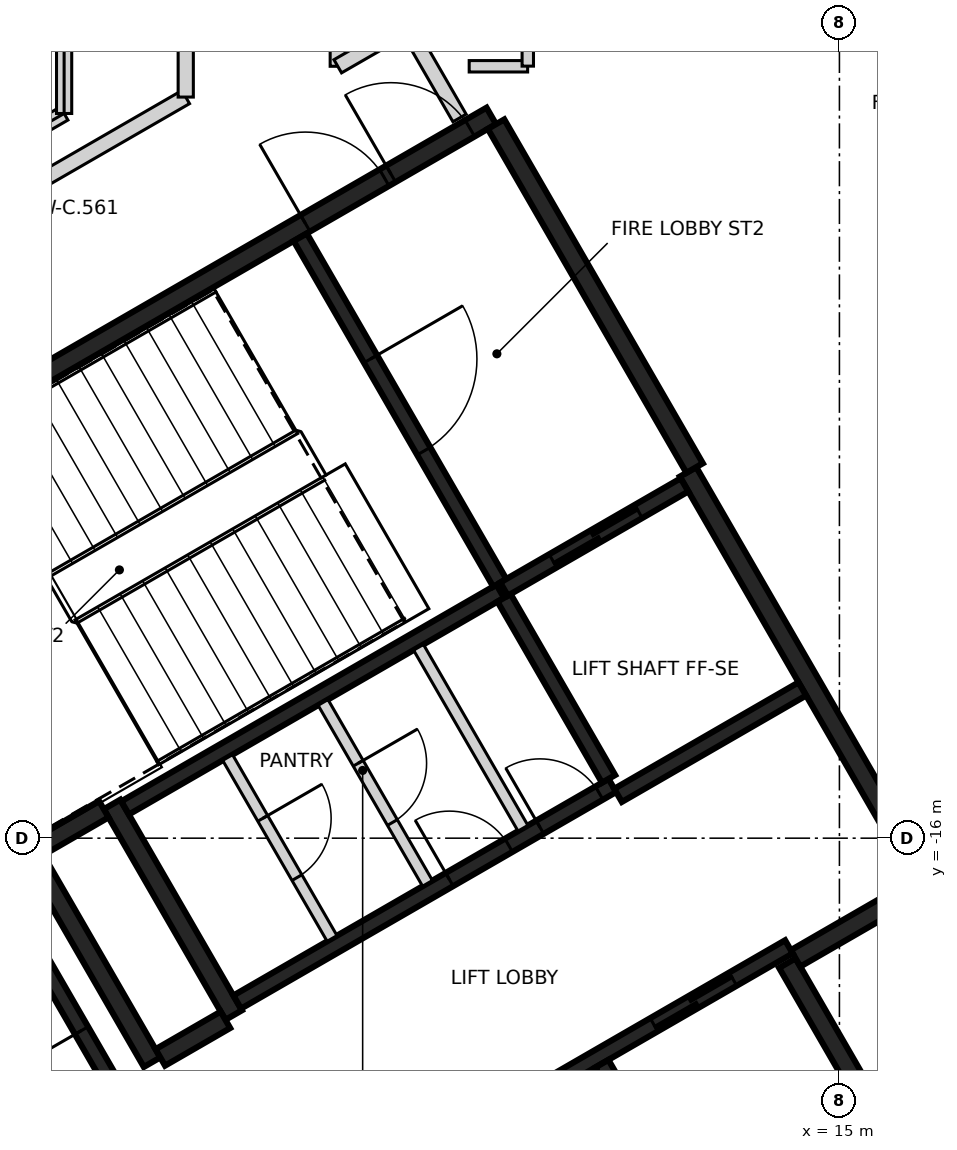
"""IFC4 building model, lengths in metres.
Left out: names, types, materials, properties, quantities, classifications, styles, units other than length and angle.
Written with IfcOpenShell. Run it as: python <this file> out.ifc"""

import sys

from ifc_helpers import new_model, si_unit, direction, frame, frame_2d, origin, place, context, subcontext, project, spatial, rectangle, extrude, element, fill, save


model = new_model("IFC4")
c1 = context("Model", 3, precision=1e-05, world=origin(), true_north=direction((0.0, 1.0)))
c2 = subcontext(c1, "Body", "Model", "MODEL_VIEW")
j1 = project(units=[si_unit("LENGTHUNIT", "METRE"), si_unit("PLANEANGLEUNIT", "RADIAN")], contexts=[c1])
p1 = place(None, origin())
s1 = spatial("IfcSite", under=j1, at=p1, CompositionType="ELEMENT")
p2 = place(p1, origin())
s2 = spatial("IfcBuilding", under=s1, at=p2, CompositionType="ELEMENT")
p3 = place(p2, frame((0.0, 0.0, 154.0)))
s3 = spatial("IfcBuildingStorey", under=s2, at=p3, CompositionType="ELEMENT", Elevation=154.0)
p4 = place(p3, frame((0.417, -12.273, 0.0), z_axis=(0.0, 0.0, 1.0), x_axis=(0.866021906294, 0.500006057782, 0.0)))
e1 = element("IfcWall", 1, at=p4, inside=s3, PredefinedType="SHEAR", context=c2, shape_type="SweptSolid", body=[
    extrude(rectangle(XDim=11.55, YDim=0.25, at=frame_2d((5.775, 0.0))), origin(), (0.0, 0.0, 1.0), 3.2),
])
p5 = place(p4, frame((10.025, 0.0, 0.0)))
e2 = element("IfcOpeningElement", 2, at=p5, cuts=e1, PredefinedType="OPENING", context=c2, shape_type="SweptSolid", body=[
    extrude(rectangle(XDim=1.2, YDim=2.1, at=frame_2d((0.6, 1.05))), frame((0.0, 0.135, 0.0), z_axis=(0.0, -1.0, 0.0), x_axis=(1.0, 0.0, 0.0)), (0.0, 0.0, 1.0), 0.27),
])
p6 = place(p4, frame((8.725, 0.0, 0.0)))
e3 = element("IfcOpeningElement", 3, at=p6, cuts=e1, PredefinedType="OPENING", context=c2, shape_type="SweptSolid", body=[
    extrude(rectangle(XDim=1.2, YDim=2.1, at=frame_2d((0.6, 1.05))), frame((0.0, 0.135, 0.0), z_axis=(0.0, -1.0, 0.0), x_axis=(1.0, 0.0, 0.0)), (0.0, 0.0, 1.0), 0.27),
])
p7 = place(p3, frame((13.008, -11.181, 0.0), z_axis=(0.0, 0.0, 1.0), x_axis=(0.500004234368, -0.866022959057, 0.0)))
e4 = element("IfcWall", 4, at=p7, inside=s3, PredefinedType="SHEAR", context=c2, shape_type="SweptSolid", body=[
    extrude(rectangle(XDim=6.25, YDim=0.25, at=frame_2d((3.125, 0.0))), origin(), (0.0, 0.0, 1.0), 3.2),
])
p8 = place(p3, frame((10.483, -6.606, 0.0), z_axis=(0.0, 0.0, 1.0), x_axis=(0.49999885962, -0.866026062182, 0.0)))
e5 = element("IfcWall", 5, at=p8, inside=s3, PredefinedType="SHEAR", context=c2, shape_type="SweptSolid", body=[
    extrude(rectangle(XDim=5.225, YDim=0.25, at=frame_2d((2.612, 0.0))), origin(), (0.0, 0.0, 1.0), 3.2),
])
p9 = place(p3, frame((7.031, -18.327, 0.0), z_axis=(0.0, 0.0, 1.0), x_axis=(-0.499971222258, 0.866042017984, 0.0)))
e6 = element("IfcWall", 6, at=p9, inside=s3, PredefinedType="SHEAR", context=c2, shape_type="SweptSolid", body=[
    extrude(rectangle(XDim=3.2, YDim=0.25, at=frame_2d((1.6, 0.0))), origin(), (0.0, 0.0, 1.0), 3.2),
])
p10 = place(p3, frame((14.315, -17.644, 0.0), z_axis=(0.0, 0.0, 1.0), x_axis=(0.500023226632, -0.866011993467, 0.0)))
e7 = element("IfcWall", 7, at=p10, inside=s3, PredefinedType="SHEAR", context=c2, shape_type="SweptSolid", body=[
    extrude(rectangle(XDim=2.974, YDim=0.25, at=frame_2d((1.487, 0.0))), origin(), (0.0, 0.0, 1.0), 3.2),
])
p11 = place(p3, frame((4.414, -16.276, 0.0), z_axis=(0.0, 0.0, 1.0), x_axis=(0.500003324108, -0.866023484601, 0.0)))
e8 = element("IfcWall", 8, at=p11, inside=s3, PredefinedType="SHEAR", context=c2, shape_type="SweptSolid", body=[
    extrude(rectangle(XDim=3.085, YDim=0.25, at=frame_2d((1.542, 0.0))), origin(), (0.0, 0.0, 1.0), 3.2),
])
p12 = place(p3, frame((5.322, -15.619, 0.0), z_axis=(0.0, 0.0, 1.0), x_axis=(-0.866026229868, -0.499998569178, 0.0)))
e9 = element("IfcWall", 9, at=p12, inside=s3, PredefinedType="SHEAR", context=c2, shape_type="SweptSolid", body=[
    extrude(rectangle(XDim=2.449, YDim=0.25, at=frame_2d((1.225, 0.0))), origin(), (0.0, 0.0, 1.0), 3.2),
])
p13 = place(p3, frame((16.025, -16.656, 0.0), z_axis=(0.0, 0.0, 1.0), x_axis=(-0.866016279763, -0.500015802937, 0.0)))
e10 = element("IfcWall", 10, at=p13, inside=s3, PredefinedType="SHEAR", context=c2, shape_type="SweptSolid", body=[
    extrude(rectangle(XDim=1.849, YDim=0.25, at=frame_2d((0.925, 0.0))), origin(), (0.0, 0.0, 1.0), 3.2),
])
p14 = place(p3, frame((6.065, -18.885, 0.0), z_axis=(0.0, 0.0, 1.0), x_axis=(0.866017078145, 0.500014420154, 0.0)))
e11 = element("IfcWall", 11, at=p14, inside=s3, PredefinedType="SHEAR", context=c2, shape_type="SweptSolid", body=[
    extrude(rectangle(XDim=0.989, YDim=0.25, at=frame_2d((0.495, 0.0))), origin(), (0.0, 0.0, 1.0), 3.2),
])
p15 = place(p3, frame((9.052, -20.48, 0.0), z_axis=(0.0, 0.0, 1.0), x_axis=(0.866030299012, 0.499991521122, 0.0)))
e12 = element("IfcWall", 12, at=p15, inside=s3, PredefinedType="SHEAR", context=c2, shape_type="SweptSolid", body=[
    extrude(rectangle(XDim=6.1, YDim=0.2, at=frame_2d((3.05, 0.0))), origin(), (0.0, 0.0, 1.0), 3.2),
])
p16 = place(p15, frame((1.0, 0.0, 0.0)))
e13 = element("IfcOpeningElement", 13, at=p16, cuts=e12, PredefinedType="OPENING", context=c2, shape_type="SweptSolid", body=[
    extrude(rectangle(XDim=1.2, YDim=2.1, at=frame_2d((0.6, 1.05))), frame((0.0, 0.11, 0.0), z_axis=(0.0, -1.0, 0.0), x_axis=(1.0, 0.0, 0.0)), (0.0, 0.0, 1.0), 0.22),
])
p17 = place(p15, frame((4.05, 0.0, 0.0)))
e14 = element("IfcOpeningElement", 14, at=p17, cuts=e12, PredefinedType="OPENING", context=c2, shape_type="SweptSolid", body=[
    extrude(rectangle(XDim=1.2, YDim=2.1, at=frame_2d((0.6, 1.05))), frame((0.0, 0.11, 0.0), z_axis=(0.0, -1.0, 0.0), x_axis=(1.0, 0.0, 0.0)), (0.0, 0.0, 1.0), 0.22),
])
p18 = place(p3, frame((10.538, -12.752, 0.0), z_axis=(0.0, 0.0, 1.0), x_axis=(-0.866038630372, -0.499977090179, 0.0)))
e15 = element("IfcWall", 15, at=p18, inside=s3, PredefinedType="SHEAR", context=c2, shape_type="SweptSolid", body=[
    extrude(rectangle(XDim=5.699, YDim=0.2, at=frame_2d((2.85, 0.0))), origin(), (0.0, 0.0, 1.0), 3.2),
])
p19 = place(p3, frame((7.077, -18.156, 0.0), z_axis=(0.0, 0.0, 1.0), x_axis=(0.866038630372, 0.499977090179, 0.0)))
e16 = element("IfcWall", 16, at=p19, inside=s3, PredefinedType="SHEAR", context=c2, shape_type="SweptSolid", body=[
    extrude(rectangle(XDim=5.699, YDim=0.2, at=frame_2d((2.85, 0.0))), origin(), (0.0, 0.0, 1.0), 3.2),
])
p20 = place(p19, frame((3.224, 0.0, 0.0)))
e17 = element("IfcOpeningElement", 17, at=p20, cuts=e16, PredefinedType="OPENING", context=c2, shape_type="SweptSolid", body=[
    extrude(rectangle(XDim=0.9, YDim=2.1, at=frame_2d((0.45, 1.05))), frame((0.0, 0.11, 0.0), z_axis=(0.0, -1.0, 0.0), x_axis=(1.0, 0.0, 0.0)), (0.0, 0.0, 1.0), 0.22),
])
p21 = place(p19, frame((4.599, 0.0, 0.0)))
e18 = element("IfcOpeningElement", 18, at=p21, cuts=e16, PredefinedType="OPENING", context=c2, shape_type="SweptSolid", body=[
    extrude(rectangle(XDim=0.9, YDim=2.1, at=frame_2d((0.45, 1.05))), frame((0.0, 0.11, 0.0), z_axis=(0.0, -1.0, 0.0), x_axis=(1.0, 0.0, 0.0)), (0.0, 0.0, 1.0), 0.22),
])
p22 = place(p3, frame((7.906, -8.094, 0.0), z_axis=(0.0, 0.0, 1.0), x_axis=(0.500024287448, -0.866011380966, 0.0)))
e19 = element("IfcWall", 19, at=p22, inside=s3, PredefinedType="SHEAR", context=c2, shape_type="SweptSolid", body=[
    extrude(rectangle(XDim=5.251, YDim=0.2, at=frame_2d((2.625, 0.0))), origin(), (0.0, 0.0, 1.0), 3.2),
])
p23 = place(p22, frame((1.849, 0.0, 0.0)))
e20 = element("IfcOpeningElement", 20, at=p23, cuts=e19, PredefinedType="OPENING", context=c2, shape_type="SweptSolid", body=[
    extrude(rectangle(XDim=1.4, YDim=2.1, at=frame_2d((0.7, 1.05))), frame((0.0, 0.11, 0.0), z_axis=(0.0, -1.0, 0.0), x_axis=(1.0, 0.0, 0.0)), (0.0, 0.0, 1.0), 0.22),
])
p24 = place(p3, frame((11.875, -18.967, 0.0), z_axis=(0.0, 0.0, 1.0), x_axis=(0.49998131003, -0.866036194175, 0.0)))
e21 = element("IfcWall", 21, at=p24, inside=s3, PredefinedType="SHEAR", context=c2, shape_type="SweptSolid", body=[
    extrude(rectangle(XDim=3.048, YDim=0.2, at=frame_2d((1.524, 0.0))), origin(), (0.0, 0.0, 1.0), 3.2),
])
p25 = place(p3, frame((5.503, -19.352, 0.0), z_axis=(0.0, 0.0, 1.0), x_axis=(-0.499986818241, 0.866033014143, 0.0)))
e22 = element("IfcWall", 22, at=p25, inside=s3, PredefinedType="SHEAR", context=c2, shape_type="SweptSolid", body=[
    extrude(rectangle(XDim=2.798, YDim=0.2, at=frame_2d((1.399, 0.0))), origin(), (0.0, 0.0, 1.0), 3.2),
])
p26 = place(p25, frame((0.949, 0.0, 0.0)))
e23 = element("IfcOpeningElement", 23, at=p26, cuts=e22, PredefinedType="OPENING", context=c2, shape_type="SweptSolid", body=[
    extrude(rectangle(XDim=0.9, YDim=2.1, at=frame_2d((0.45, 1.05))), frame((0.0, 0.11, 0.0), z_axis=(0.0, -1.0, 0.0), x_axis=(1.0, 0.0, 0.0)), (0.0, 0.0, 1.0), 0.22),
])
p27 = place(p3, frame((11.963, -15.22, 0.0), z_axis=(0.0, 0.0, 1.0), x_axis=(-0.500034990121, 0.866005201286, 0.0)))
e24 = element("IfcWall", 24, at=p27, inside=s3, PredefinedType="SHEAR", context=c2, shape_type="SweptSolid", body=[
    extrude(rectangle(XDim=2.75, YDim=0.2, at=frame_2d((1.375, 0.0))), origin(), (0.0, 0.0, 1.0), 3.2),
])
p28 = place(p3, frame((10.587, -12.723, 0.0), z_axis=(0.0, 0.0, 1.0), x_axis=(0.866037306777, 0.499979382845, 0.0)))
e25 = element("IfcWall", 25, at=p28, inside=s3, PredefinedType="SHEAR", context=c2, shape_type="SweptSolid", body=[
    extrude(rectangle(XDim=2.742, YDim=0.2, at=frame_2d((1.371, 0.0))), origin(), (0.0, 0.0, 1.0), 3.2),
])
p29 = place(p28, frame((0.743, 0.0, 0.0)))
e26 = element("IfcOpeningElement", 26, at=p29, cuts=e25, PredefinedType="OPENING", context=c2, shape_type="SweptSolid", body=[
    extrude(rectangle(XDim=1.3, YDim=2.1, at=frame_2d((0.65, 1.05))), frame((0.0, 0.11, 0.0), z_axis=(0.0, -1.0, 0.0), x_axis=(1.0, 0.0, 0.0)), (0.0, 0.0, 1.0), 0.22),
])
p30 = place(p3, frame((14.512, -14.037, 0.0), z_axis=(0.0, 0.0, 1.0), x_axis=(-0.866044696403, -0.499966582715, 0.0)))
e27 = element("IfcWall", 27, at=p30, inside=s3, PredefinedType="SHEAR", context=c2, shape_type="SweptSolid", body=[
    extrude(rectangle(XDim=2.799, YDim=0.2, at=frame_2d((1.399, 0.0))), origin(), (0.0, 0.0, 1.0), 3.2),
])
p31 = place(p3, frame((8.207, -14.214, 0.0), z_axis=(0.0, 0.0, 1.0), x_axis=(0.50002746344, -0.86600954718, 0.0)))
e28 = element("IfcWall", 28, at=p31, inside=s3, PredefinedType="PARTITIONING", context=c2, shape_type="SweptSolid", body=[
    extrude(rectangle(XDim=2.748, YDim=0.15, at=frame_2d((1.374, 0.0))), origin(), (0.0, 0.0, 1.0), 3.2),
])
p32 = place(p31, frame((0.924, 0.0, 0.0)))
e29 = element("IfcOpeningElement", 29, at=p32, cuts=e28, PredefinedType="OPENING", context=c2, shape_type="SweptSolid", body=[
    extrude(rectangle(XDim=0.9, YDim=2.1, at=frame_2d((0.45, 1.05))), frame((0.0, 0.085, 0.0), z_axis=(0.0, -1.0, 0.0), x_axis=(1.0, 0.0, 0.0)), (0.0, 0.0, 1.0), 0.17),
])
p33 = place(p3, frame((9.462, -13.489, 0.0), z_axis=(0.0, 0.0, 1.0), x_axis=(0.499988999718, -0.866031754707, 0.0)))
e30 = element("IfcWall", 30, at=p33, inside=s3, PredefinedType="PARTITIONING", context=c2, shape_type="SweptSolid", body=[
    extrude(rectangle(XDim=2.749, YDim=0.15, at=frame_2d((1.374, 0.0))), origin(), (0.0, 0.0, 1.0), 3.2),
])
p34 = place(p3, frame((6.951, -14.939, 0.0), z_axis=(0.0, 0.0, 1.0), x_axis=(0.499988999718, -0.866031754707, 0.0)))
e31 = element("IfcWall", 31, at=p34, inside=s3, PredefinedType="PARTITIONING", context=c2, shape_type="SweptSolid", body=[
    extrude(rectangle(XDim=2.749, YDim=0.15, at=frame_2d((1.374, 0.0))), origin(), (0.0, 0.0, 1.0), 3.2),
])
p35 = place(p34, frame((0.924, 0.0, 0.0)))
e32 = element("IfcOpeningElement", 32, at=p35, cuts=e31, PredefinedType="OPENING", context=c2, shape_type="SweptSolid", body=[
    extrude(rectangle(XDim=0.9, YDim=2.1, at=frame_2d((0.45, 1.05))), frame((0.0, 0.085, 0.0), z_axis=(0.0, -1.0, 0.0), x_axis=(1.0, 0.0, 0.0)), (0.0, 0.0, 1.0), 0.17),
])
p36 = place(p3, frame((2.212, -8.667, 0.0), z_axis=(0.0, 0.0, 1.0), x_axis=(0.866053587187, 0.499951181737, 0.0)))
e33 = element("IfcWall", 33, at=p36, inside=s3, PredefinedType="PARTITIONING", context=c2, shape_type="SweptSolid", body=[
    extrude(rectangle(XDim=4.835, YDim=0.2, at=frame_2d((2.418, 0.0))), origin(), (0.0, 0.0, 1.0), 2.3),
])
p37 = place(p3, frame((6.4, -6.25, 0.0), z_axis=(0.0, 0.0, 1.0), x_axis=(0.0, 1.0, 0.0)))
e34 = element("IfcWall", 34, at=p37, inside=s3, PredefinedType="PARTITIONING", context=c2, shape_type="SweptSolid", body=[
    extrude(rectangle(XDim=12.5, YDim=0.2, at=frame_2d((6.25, 0.0))), origin(), (0.0, 0.0, 1.0), 3.2),
])
p38 = place(p37, frame((2.077, 0.0, 0.0)))
e35 = element("IfcOpeningElement", 35, at=p38, cuts=e34, PredefinedType="OPENING", context=c2, shape_type="SweptSolid", body=[
    extrude(rectangle(XDim=0.9, YDim=2.1, at=frame_2d((0.45, 1.05))), frame((0.0, 0.11, 0.0), z_axis=(0.0, -1.0, 0.0), x_axis=(1.0, 0.0, 0.0)), (0.0, 0.0, 1.0), 0.22),
])
p39 = place(p37, frame((8.315, 0.0, 0.0)))
e36 = element("IfcOpeningElement", 36, at=p39, cuts=e34, PredefinedType="OPENING", context=c2, shape_type="SweptSolid", body=[
    extrude(rectangle(XDim=0.9, YDim=2.1, at=frame_2d((0.45, 1.05))), frame((0.0, 0.11, 0.0), z_axis=(0.0, -1.0, 0.0), x_axis=(1.0, 0.0, 0.0)), (0.0, 0.0, 1.0), 0.22),
])
p40 = place(p3, frame((8.4, -5.845, 0.0), z_axis=(0.0, 0.0, 1.0), x_axis=(0.0, 1.0, 0.0)))
e37 = element("IfcWall", 37, at=p40, inside=s3, PredefinedType="PARTITIONING", context=c2, shape_type="SweptSolid", body=[
    extrude(rectangle(XDim=9.923, YDim=0.2, at=frame_2d((4.961, 0.0))), origin(), (0.0, 0.0, 1.0), 3.2),
])
p41 = place(p40, frame((3.5, 0.0, 0.0)))
e38 = element("IfcOpeningElement", 38, at=p41, cuts=e37, PredefinedType="OPENING", context=c2, shape_type="SweptSolid", body=[
    extrude(rectangle(XDim=0.95, YDim=2.1, at=frame_2d((0.475, 1.05))), frame((0.0, 0.11, 0.0), z_axis=(0.0, -1.0, 0.0), x_axis=(1.0, 0.0, 0.0)), (0.0, 0.0, 1.0), 0.22),
])
p42 = place(p40, frame((6.023, 0.0, 0.0)))
e39 = element("IfcOpeningElement", 39, at=p42, cuts=e37, PredefinedType="OPENING", context=c2, shape_type="SweptSolid", body=[
    extrude(rectangle(XDim=0.95, YDim=2.1, at=frame_2d((0.475, 1.05))), frame((0.0, 0.11, 0.0), z_axis=(0.0, -1.0, 0.0), x_axis=(1.0, 0.0, 0.0)), (0.0, 0.0, 1.0), 0.22),
])
p43 = place(p3, frame((8.4, -5.845, 0.0), z_axis=(0.0, 0.0, 1.0), x_axis=(0.866313671633, 0.499500372715, 0.0)))
e40 = element("IfcWall", 40, at=p43, inside=s3, PredefinedType="PARTITIONING", context=c2, shape_type="SweptSolid", body=[
    extrude(rectangle(XDim=1.047, YDim=0.2, at=frame_2d((0.523, 0.0))), origin(), (0.0, 0.0, 1.0), 3.2),
])
p44 = place(p3, frame((9.307, -5.322, 0.0), z_axis=(0.0, 0.0, 1.0), x_axis=(0.499955621637, -0.866051024128, 0.0)))
e41 = element("IfcWall", 41, at=p44, inside=s3, PredefinedType="PARTITIONING", context=c2, shape_type="SweptSolid", body=[
    extrude(rectangle(XDim=1.39, YDim=0.2, at=frame_2d((0.695, 0.0))), origin(), (0.0, 0.0, 1.0), 3.2),
])
p45 = place(p3, frame((3.2, -7.39, 0.0), z_axis=(0.0, 0.0, 1.0), x_axis=(0.865875248522, 0.500259986404, 0.0)))
e42 = element("IfcWall", 42, at=p45, inside=s3, PredefinedType="PARTITIONING", context=c2, shape_type="SweptSolid", body=[
    extrude(rectangle(XDim=1.848, YDim=0.2, at=frame_2d((0.924, 0.0))), origin(), (0.0, 0.0, 1.0), 2.3),
])
p46 = place(p3, frame((4.8, -6.466, 0.0), z_axis=(0.0, 0.0, 1.0), x_axis=(0.0, 1.0, 0.0)))
e43 = element("IfcWall", 43, at=p46, inside=s3, PredefinedType="PARTITIONING", context=c2, shape_type="SweptSolid", body=[
    extrude(rectangle(XDim=12.932, YDim=0.2, at=frame_2d((6.466, 0.0))), origin(), (0.0, 0.0, 1.0), 2.3),
])
p47 = place(p3, frame((10.898, -5.845, 0.0), z_axis=(0.0, 0.0, 1.0), x_axis=(-1.0, 0.0, 0.0)))
e44 = element("IfcWall", 44, at=p47, inside=s3, PredefinedType="PARTITIONING", context=c2, shape_type="SweptSolid", body=[
    extrude(rectangle(XDim=0.769, YDim=0.15, at=frame_2d((0.384, 0.0))), origin(), (0.0, 0.0, 1.0), 3.2),
])
p48 = place(p3, frame((10.9, -5.843, 0.0), z_axis=(0.0, 0.0, 1.0), x_axis=(0.0, 1.0, 0.0)))
e45 = element("IfcWall", 45, at=p48, inside=s3, PredefinedType="PARTITIONING", context=c2, shape_type="SweptSolid", body=[
    extrude(rectangle(XDim=2.696, YDim=0.15, at=frame_2d((1.348, 0.0))), origin(), (0.0, 0.0, 1.0), 3.2),
])
p49 = place(p29, origin())
e46 = element("IfcDoor", 46, at=p49, inside=s3, OperationType="SLIDING_TO_LEFT", PredefinedType="DOOR", context=c2, shape_type="SweptSolid", body=[
    extrude(rectangle(XDim=1.3, YDim=2.1, at=frame_2d((0.65, 1.05))), frame((0.0, 0.025, 0.0), z_axis=(0.0, -1.0, 0.0), x_axis=(1.0, 0.0, 0.0)), (0.0, 0.0, 1.0), 0.05),
])
fill(e26, e46)
p50 = place(p17, origin())
e47 = element("IfcDoor", 47, at=p50, inside=s3, OperationType="DOUBLE_DOOR_SLIDING", PredefinedType="DOOR", context=c2, shape_type="SweptSolid", body=[
    extrude(rectangle(XDim=1.2, YDim=2.1, at=frame_2d((0.6, 1.05))), frame((0.0, 0.025, 0.0), z_axis=(0.0, -1.0, 0.0), x_axis=(1.0, 0.0, 0.0)), (0.0, 0.0, 1.0), 0.05),
])
fill(e14, e47)
p51 = place(p5, origin())
e48 = element("IfcDoor", 48, at=p51, inside=s3, OperationType="SINGLE_SWING_LEFT", PredefinedType="DOOR", context=c2, shape_type="SweptSolid", body=[
    extrude(rectangle(XDim=1.2, YDim=2.1, at=frame_2d((0.6, 1.05))), frame((0.0, 0.025, 0.0), z_axis=(0.0, -1.0, 0.0), x_axis=(1.0, 0.0, 0.0)), (0.0, 0.0, 1.0), 0.05),
])
fill(e2, e48)
p52 = place(p6, origin())
e49 = element("IfcDoor", 49, at=p52, inside=s3, OperationType="SINGLE_SWING_RIGHT", PredefinedType="DOOR", context=c2, shape_type="SweptSolid", body=[
    extrude(rectangle(XDim=1.2, YDim=2.1, at=frame_2d((0.6, 1.05))), frame((0.0, 0.025, 0.0), z_axis=(0.0, -1.0, 0.0), x_axis=(1.0, 0.0, 0.0)), (0.0, 0.0, 1.0), 0.05),
])
fill(e3, e49)
p53 = place(p23, origin())
e50 = element("IfcDoor", 50, at=p53, inside=s3, OperationType="SINGLE_SWING_LEFT", PredefinedType="DOOR", context=c2, shape_type="SweptSolid", body=[
    extrude(rectangle(XDim=1.4, YDim=2.1, at=frame_2d((0.7, 1.05))), frame((0.0, 0.025, 0.0), z_axis=(0.0, -1.0, 0.0), x_axis=(1.0, 0.0, 0.0)), (0.0, 0.0, 1.0), 0.05),
])
fill(e20, e50)
p54 = place(p20, origin())
e51 = element("IfcDoor", 51, at=p54, inside=s3, OperationType="SINGLE_SWING_RIGHT", PredefinedType="DOOR", context=c2, shape_type="SweptSolid", body=[
    extrude(rectangle(XDim=0.9, YDim=2.1, at=frame_2d((0.45, 1.05))), frame((0.0, 0.025, 0.0), z_axis=(0.0, -1.0, 0.0), x_axis=(1.0, 0.0, 0.0)), (0.0, 0.0, 1.0), 0.05),
])
fill(e17, e51)
p55 = place(p21, origin())
e52 = element("IfcDoor", 52, at=p55, inside=s3, OperationType="SINGLE_SWING_LEFT", PredefinedType="DOOR", context=c2, shape_type="SweptSolid", body=[
    extrude(rectangle(XDim=0.9, YDim=2.1, at=frame_2d((0.45, 1.05))), frame((0.0, 0.025, 0.0), z_axis=(0.0, -1.0, 0.0), x_axis=(1.0, 0.0, 0.0)), (0.0, 0.0, 1.0), 0.05),
])
fill(e18, e52)
p56 = place(p26, origin())
e53 = element("IfcDoor", 53, at=p56, inside=s3, OperationType="SINGLE_SWING_RIGHT", PredefinedType="DOOR", context=c2, shape_type="SweptSolid", body=[
    extrude(rectangle(XDim=0.9, YDim=2.1, at=frame_2d((0.45, 1.05))), frame((0.0, 0.025, 0.0), z_axis=(0.0, -1.0, 0.0), x_axis=(1.0, 0.0, 0.0)), (0.0, 0.0, 1.0), 0.05),
])
fill(e23, e53)
p57 = place(p32, origin())
e54 = element("IfcDoor", 54, at=p57, inside=s3, OperationType="SINGLE_SWING_LEFT", PredefinedType="DOOR", context=c2, shape_type="SweptSolid", body=[
    extrude(rectangle(XDim=0.9, YDim=2.1, at=frame_2d((0.45, 1.05))), frame((0.0, 0.025, 0.0), z_axis=(0.0, -1.0, 0.0), x_axis=(1.0, 0.0, 0.0)), (0.0, 0.0, 1.0), 0.05),
])
fill(e29, e54)
p58 = place(p35, origin())
e55 = element("IfcDoor", 55, at=p58, inside=s3, OperationType="SINGLE_SWING_RIGHT", PredefinedType="DOOR", context=c2, shape_type="SweptSolid", body=[
    extrude(rectangle(XDim=0.9, YDim=2.1, at=frame_2d((0.45, 1.05))), frame((0.0, 0.025, 0.0), z_axis=(0.0, -1.0, 0.0), x_axis=(1.0, 0.0, 0.0)), (0.0, 0.0, 1.0), 0.05),
])
fill(e32, e55)
save(model, sys.argv[1])
